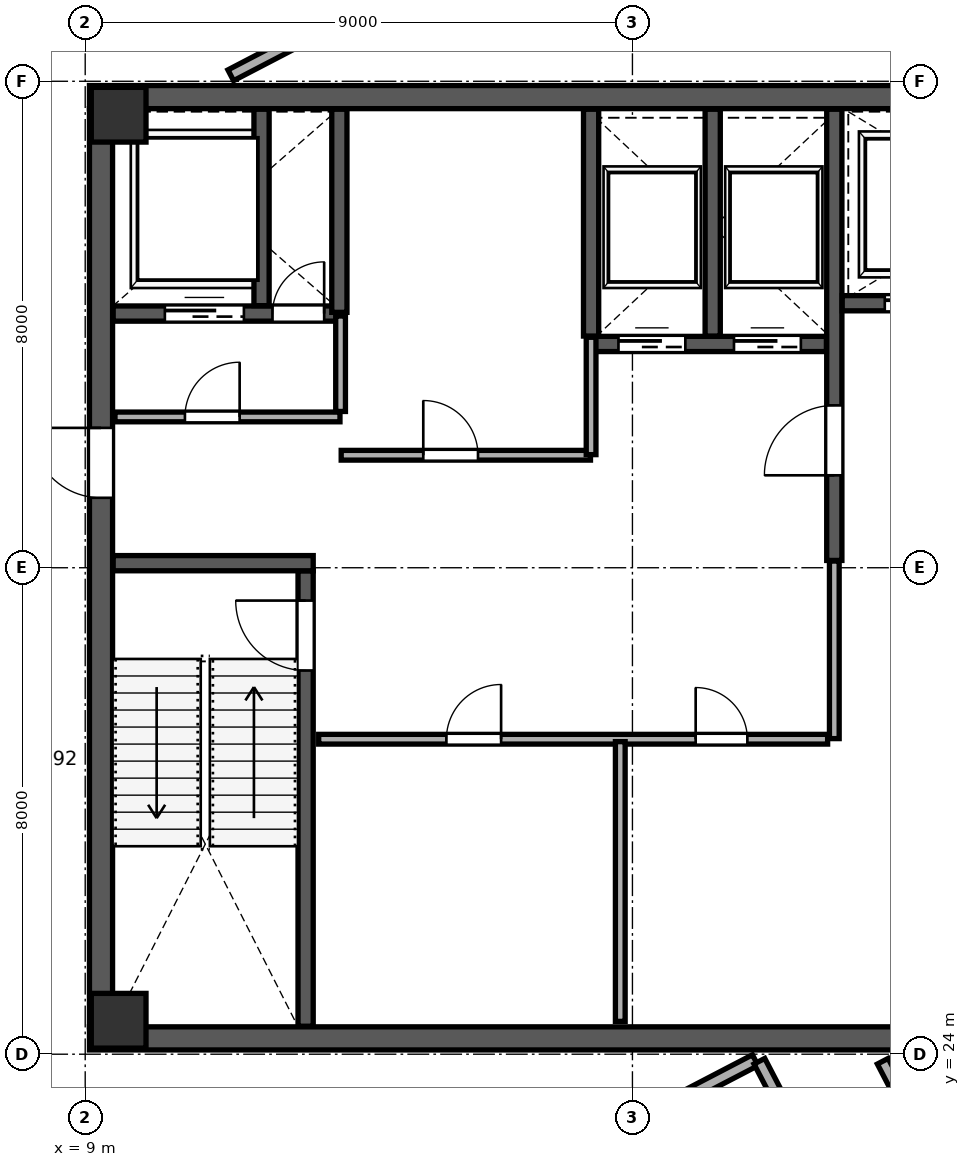
"""IFC4 building model, lengths in metres.
Left out: names, types, materials, properties, quantities, classifications, styles, units other than length and angle.
Written with IfcOpenShell. Run it as: python <this file> out.ifc"""

import sys

from ifc_helpers import new_model, si_unit, direction, frame, frame_2d, origin, origin_2d, place, context, subcontext, project, spatial, rectangle, extrude, source, transform, mapped, element, fill, save


model = new_model("IFC4")
c1 = context("Model", 3, precision=1e-05, world=origin(), true_north=direction((0.0, 1.0)))
c2 = subcontext(c1, "Body", "Model", "MODEL_VIEW")
j1 = project(units=[si_unit("LENGTHUNIT", "METRE"), si_unit("PLANEANGLEUNIT", "RADIAN")], contexts=[c1])
p1 = place(None, origin())
s1 = spatial("IfcSite", under=j1, at=p1, CompositionType="ELEMENT")
p2 = place(p1, origin())
s2 = spatial("IfcBuilding", under=s1, at=p2, CompositionType="ELEMENT")
p3 = place(p2, frame((0.0, 0.0, 336.6)))
s3 = spatial("IfcBuildingStorey", under=s2, at=p3, CompositionType="ELEMENT", Elevation=336.6)
m1 = source(origin(), c2, "Body", "SweptSolid", [
    extrude(rectangle(XDim=0.9, YDim=0.9, at=origin_2d()), origin(), (0.0, 0.0, 1.0), 4.198),
])
for number, where, z_axis, x_axis in (
    (1, (9.55, 24.55, 0.001), (0.0, 0.0, 1.0), (1.0, 0.0, 0.0)),
    (2, (9.55, 39.45, 0.001), (0.0, 0.0, 1.0), (1.0, 0.0, 0.0)),
):
    element("IfcColumn", number, at=place(p3, frame(where, z_axis=z_axis, x_axis=x_axis)), inside=s3, PredefinedType="COLUMN", context=c2, shape_type="MappedRepresentation", body=[
        mapped(m1, transform((0.0, 0.0, 0.0), scale=1.0)),
    ])
p4 = place(p3, frame((9.26, 24.45, 0.0), z_axis=(0.0, 0.0, 1.0), x_axis=(0.0, 1.0, 0.0)))
e3 = element("IfcWall", 3, at=p4, inside=s3, PredefinedType="SHEAR", context=c2, shape_type="SweptSolid", body=[
    extrude(rectangle(XDim=15.1, YDim=0.38, at=frame_2d((7.55, 0.0))), origin(), (0.0, 0.0, 1.0), 3.96),
])
p5 = place(p4, frame((8.7, 0.0, 0.0)))
e4 = element("IfcOpeningElement", 4, at=p5, cuts=e3, PredefinedType="OPENING", context=c2, shape_type="SweptSolid", body=[
    extrude(rectangle(XDim=1.15, YDim=2.2, at=frame_2d((0.575, 1.1))), frame((0.0, 0.2, 0.0), z_axis=(0.0, -1.0, 0.0), x_axis=(1.0, 0.0, 0.0)), (0.0, 0.0, 1.0), 0.4),
])
for number, where, z_axis, x_axis in (
    (5, (9.07, 24.26, 0.0), (0.0, 0.0, 1.0), (1.0, 0.0, 0.0)),
    (6, (9.07, 39.74, 0.0), (0.0, 0.0, 1.0), (1.0, 0.0, 0.0)),
):
    element("IfcWall", number, at=place(p3, frame(where, z_axis=z_axis, x_axis=x_axis)), inside=s3, PredefinedType="SHEAR", context=c2, shape_type="SweptSolid", body=[
        extrude(rectangle(XDim=17.86, YDim=0.38, at=frame_2d((8.93, 0.0))), origin(), (0.0, 0.0, 1.0), 3.96),
    ])
p6 = place(p3, frame((12.625, 24.46, 0.0), z_axis=(0.0, 0.0, 1.0), x_axis=(0.0, 1.0, 0.0)))
e7 = element("IfcWall", 7, at=p6, inside=s3, PredefinedType="SHEAR", context=c2, shape_type="SweptSolid", body=[
    extrude(rectangle(XDim=7.49, YDim=0.25, at=frame_2d((3.745, 0.0))), origin(), (0.0, 0.0, 1.0), 3.96),
])
p7 = place(p6, frame((5.85, 0.0, 0.0)))
e8 = element("IfcOpeningElement", 8, at=p7, cuts=e7, PredefinedType="OPENING", context=c2, shape_type="SweptSolid", body=[
    extrude(rectangle(XDim=1.15, YDim=2.2, at=frame_2d((0.575, 1.1))), frame((0.0, 0.135, 0.0), z_axis=(0.0, -1.0, 0.0), x_axis=(1.0, 0.0, 0.0)), (0.0, 0.0, 1.0), 0.27),
])
p8 = place(p3, frame((9.46, 32.075, 0.0), z_axis=(0.0, 0.0, 1.0), x_axis=(1.0, 0.0, 0.0)))
e9 = element("IfcWall", 9, at=p8, inside=s3, PredefinedType="SHEAR", context=c2, shape_type="SweptSolid", body=[
    extrude(rectangle(XDim=3.29, YDim=0.25, at=frame_2d((1.645, 0.0))), origin(), (0.0, 0.0, 1.0), 3.96),
])
p9 = place(p3, frame((21.32, 32.12, 0.0), z_axis=(0.0, 0.0, 1.0), x_axis=(0.0, 1.0, 0.0)))
e10 = element("IfcWall", 10, at=p9, inside=s3, PredefinedType="SHEAR", context=c2, shape_type="SweptSolid", body=[
    extrude(rectangle(XDim=7.42, YDim=0.25, at=frame_2d((3.71, 0.0))), origin(), (0.0, 0.0, 1.0), 3.96),
])
p10 = place(p9, frame((1.4, 0.0, 0.0)))
e11 = element("IfcOpeningElement", 11, at=p10, cuts=e10, PredefinedType="OPENING", context=c2, shape_type="SweptSolid", body=[
    extrude(rectangle(XDim=1.15, YDim=2.2, at=frame_2d((0.575, 1.1))), frame((0.0, 0.135, 0.0), z_axis=(0.0, -1.0, 0.0), x_axis=(1.0, 0.0, 0.0)), (0.0, 0.0, 1.0), 0.27),
])
p11 = place(p3, frame((9.46, 36.18, 0.0), z_axis=(0.0, 0.0, 1.0), x_axis=(1.0, 0.0, 0.0)))
e12 = element("IfcWall", 12, at=p11, inside=s3, PredefinedType="SHEAR", context=c2, shape_type="SweptSolid", body=[
    extrude(rectangle(XDim=3.79, YDim=0.25, at=frame_2d((1.895, 0.0))), origin(), (0.0, 0.0, 1.0), 3.96),
])
p12 = place(p11, frame((2.62, 0.0, 0.0)))
e13 = element("IfcOpeningElement", 13, at=p12, cuts=e12, PredefinedType="OPENING", context=c2, shape_type="SweptSolid", body=[
    extrude(rectangle(XDim=0.85, YDim=2.1, at=frame_2d((0.425, 1.05))), frame((0.0, 0.135, 0.0), z_axis=(0.0, -1.0, 0.0), x_axis=(1.0, 0.0, 0.0)), (0.0, 0.0, 1.0), 0.27),
])
p13 = place(p11, frame((0.85, 0.0, 0.0)))
e14 = element("IfcOpeningElement", 14, at=p13, cuts=e12, PredefinedType="OPENING", context=c2, shape_type="SweptSolid", body=[
    extrude(rectangle(XDim=1.3, YDim=2.25, at=frame_2d((0.65, 1.125))), frame((0.0, 0.135, 0.0), z_axis=(0.0, -1.0, 0.0), x_axis=(1.0, 0.0, 0.0)), (0.0, 0.0, 1.0), 0.27),
])
p14 = place(p3, frame((11.9, 36.31, 0.0), z_axis=(0.0, 0.0, 1.0), x_axis=(0.0, 1.0, 0.0)))
e15 = element("IfcWall", 15, at=p14, inside=s3, PredefinedType="SHEAR", context=c2, shape_type="SweptSolid", body=[
    extrude(rectangle(XDim=3.23, YDim=0.25, at=frame_2d((1.615, 0.0))), origin(), (0.0, 0.0, 1.0), 3.96),
])
p15 = place(p3, frame((21.45, 36.35, 0.0), z_axis=(0.0, 0.0, 1.0), x_axis=(1.0, 0.0, 0.0)))
e16 = element("IfcWall", 16, at=p15, inside=s3, PredefinedType="SHEAR", context=c2, shape_type="SweptSolid", body=[
    extrude(rectangle(XDim=5.09, YDim=0.25, at=frame_2d((2.545, 0.0))), origin(), (0.0, 0.0, 1.0), 3.96),
])
p16 = place(p15, frame((0.7, 0.0, 0.0)))
e17 = element("IfcOpeningElement", 17, at=p16, cuts=e16, PredefinedType="OPENING", context=c2, shape_type="SweptSolid", body=[
    extrude(rectangle(XDim=1.2, YDim=2.2, at=frame_2d((0.6, 1.1))), frame((0.0, 0.135, 0.0), z_axis=(0.0, -1.0, 0.0), x_axis=(1.0, 0.0, 0.0)), (0.0, 0.0, 1.0), 0.27),
])
p17 = place(p15, frame((3.25, 0.0, 0.0)))
e18 = element("IfcOpeningElement", 18, at=p17, cuts=e16, PredefinedType="OPENING", context=c2, shape_type="SweptSolid", body=[
    extrude(rectangle(XDim=1.2, YDim=2.2, at=frame_2d((0.6, 1.1))), frame((0.0, 0.135, 0.0), z_axis=(0.0, -1.0, 0.0), x_axis=(1.0, 0.0, 0.0)), (0.0, 0.0, 1.0), 0.27),
])
p18 = place(p3, frame((13.18, 36.2, 0.0), z_axis=(0.0, 0.0, 1.0), x_axis=(0.0, 1.0, 0.0)))
e19 = element("IfcWall", 19, at=p18, inside=s3, PredefinedType="SHEAR", context=c2, shape_type="SweptSolid", body=[
    extrude(rectangle(XDim=3.34, YDim=0.25, at=frame_2d((1.67, 0.0))), origin(), (0.0, 0.0, 1.0), 3.96),
])
p19 = place(p3, frame((17.32, 35.68, 0.0), z_axis=(0.0, 0.0, 1.0), x_axis=(1.0, 0.0, 0.0)))
e20 = element("IfcWall", 20, at=p19, inside=s3, PredefinedType="SHEAR", context=c2, shape_type="SweptSolid", body=[
    extrude(rectangle(XDim=3.87, YDim=0.25, at=frame_2d((1.935, 0.0))), origin(), (0.0, 0.0, 1.0), 3.96),
])
p20 = place(p19, frame((0.45, 0.0, 0.0)))
e21 = element("IfcOpeningElement", 21, at=p20, cuts=e20, PredefinedType="OPENING", context=c2, shape_type="SweptSolid", body=[
    extrude(rectangle(XDim=1.1, YDim=2.2, at=frame_2d((0.55, 1.1))), frame((0.0, 0.135, 0.0), z_axis=(0.0, -1.0, 0.0), x_axis=(1.0, 0.0, 0.0)), (0.0, 0.0, 1.0), 0.27),
])
p21 = place(p19, frame((2.35, 0.0, 0.0)))
e22 = element("IfcOpeningElement", 22, at=p21, cuts=e20, PredefinedType="OPENING", context=c2, shape_type="SweptSolid", body=[
    extrude(rectangle(XDim=1.1, YDim=2.2, at=frame_2d((0.55, 1.1))), frame((0.0, 0.135, 0.0), z_axis=(0.0, -1.0, 0.0), x_axis=(1.0, 0.0, 0.0)), (0.0, 0.0, 1.0), 0.27),
])
for number, where, z_axis, x_axis in (
    (23, (17.32, 35.81, 0.0), (0.0, 0.0, 1.0), (0.0, 1.0, 0.0)),
    (24, (19.32, 35.81, 0.0), (0.0, 0.0, 1.0), (0.0, 1.0, 0.0)),
):
    element("IfcWall", number, at=place(p3, frame(where, z_axis=z_axis, x_axis=x_axis)), inside=s3, PredefinedType="SHEAR", context=c2, shape_type="SweptSolid", body=[
        extrude(rectangle(XDim=3.73, YDim=0.25, at=frame_2d((1.865, 0.0))), origin(), (0.0, 0.0, 1.0), 3.96),
    ])
p22 = place(p3, frame((9.49, 34.48, 0.0), z_axis=(0.0, 0.0, 1.0), x_axis=(1.0, 0.0, 0.0)))
e25 = element("IfcWall", 25, at=p22, inside=s3, PredefinedType="PARTITIONING", context=c2, shape_type="SweptSolid", body=[
    extrude(rectangle(XDim=3.7, YDim=0.16, at=frame_2d((1.85, 0.0))), origin(), (0.0, 0.0, 1.0), 3.96),
])
p23 = place(p22, frame((1.15, 0.0, 0.0)))
e26 = element("IfcOpeningElement", 26, at=p23, cuts=e25, PredefinedType="OPENING", context=c2, shape_type="SweptSolid", body=[
    extrude(rectangle(XDim=0.9, YDim=2.15, at=frame_2d((0.45, 1.075))), frame((0.0, 0.09, 0.0), z_axis=(0.0, -1.0, 0.0), x_axis=(1.0, 0.0, 0.0)), (0.0, 0.0, 1.0), 0.18),
])
p24 = place(p3, frame((13.2, 34.57, 0.0), z_axis=(0.0, 0.0, 1.0), x_axis=(0.0, 1.0, 0.0)))
e27 = element("IfcWall", 27, at=p24, inside=s3, PredefinedType="PARTITIONING", context=c2, shape_type="SweptSolid", body=[
    extrude(rectangle(XDim=1.57, YDim=0.16, at=frame_2d((0.785, 0.0))), origin(), (0.0, 0.0, 1.0), 3.96),
])
p25 = place(p3, frame((13.21, 33.85, 0.0), z_axis=(0.0, 0.0, 1.0), x_axis=(1.0, 0.0, 0.0)))
e28 = element("IfcWall", 28, at=p25, inside=s3, PredefinedType="PARTITIONING", context=c2, shape_type="SweptSolid", body=[
    extrude(rectangle(XDim=4.1, YDim=0.16, at=frame_2d((2.05, 0.0))), origin(), (0.0, 0.0, 1.0), 3.96),
])
p26 = place(p25, frame((1.35, 0.0, 0.0)))
e29 = element("IfcOpeningElement", 29, at=p26, cuts=e28, PredefinedType="OPENING", context=c2, shape_type="SweptSolid", body=[
    extrude(rectangle(XDim=0.9, YDim=2.15, at=frame_2d((0.45, 1.075))), frame((0.0, 0.09, 0.0), z_axis=(0.0, -1.0, 0.0), x_axis=(1.0, 0.0, 0.0)), (0.0, 0.0, 1.0), 0.18),
])
p27 = place(p3, frame((17.32, 33.86, 0.0), z_axis=(0.0, 0.0, 1.0), x_axis=(0.0, 1.0, 0.0)))
e30 = element("IfcWall", 30, at=p27, inside=s3, PredefinedType="PARTITIONING", context=c2, shape_type="SweptSolid", body=[
    extrude(rectangle(XDim=1.93, YDim=0.16, at=frame_2d((0.965, 0.0))), origin(), (0.0, 0.0, 1.0), 3.96),
])
p28 = place(p3, frame((12.84, 29.18, 0.0), z_axis=(0.0, 0.0, 1.0), x_axis=(1.0, 0.0, 0.0)))
e31 = element("IfcWall", 31, at=p28, inside=s3, PredefinedType="PARTITIONING", context=c2, shape_type="SweptSolid", body=[
    extrude(rectangle(XDim=8.37, YDim=0.16, at=frame_2d((4.185, 0.0))), origin(), (0.0, 0.0, 1.0), 3.96),
])
p29 = place(p28, frame((2.1, 0.0, 0.0)))
e32 = element("IfcOpeningElement", 32, at=p29, cuts=e31, PredefinedType="OPENING", context=c2, shape_type="SweptSolid", body=[
    extrude(rectangle(XDim=0.9, YDim=2.15, at=frame_2d((0.45, 1.075))), frame((0.0, 0.09, 0.0), z_axis=(0.0, -1.0, 0.0), x_axis=(1.0, 0.0, 0.0)), (0.0, 0.0, 1.0), 0.18),
])
p30 = place(p28, frame((6.2, 0.0, 0.0)))
e33 = element("IfcOpeningElement", 33, at=p30, cuts=e31, PredefinedType="OPENING", context=c2, shape_type="SweptSolid", body=[
    extrude(rectangle(XDim=0.85, YDim=2.1, at=frame_2d((0.425, 1.05))), frame((0.0, 0.09, 0.0), z_axis=(0.0, -1.0, 0.0), x_axis=(1.0, 0.0, 0.0)), (0.0, 0.0, 1.0), 0.18),
])
p31 = place(p3, frame((17.8, 24.54, 0.0), z_axis=(0.0, 0.0, 1.0), x_axis=(0.0, 1.0, 0.0)))
e34 = element("IfcWall", 34, at=p31, inside=s3, PredefinedType="PARTITIONING", context=c2, shape_type="SweptSolid", body=[
    extrude(rectangle(XDim=4.6, YDim=0.16, at=frame_2d((2.3, 0.0))), origin(), (0.0, 0.0, 1.0), 3.96),
])
p32 = place(p3, frame((21.32, 29.19, 0.0), z_axis=(0.0, 0.0, 1.0), x_axis=(0.0, 1.0, 0.0)))
e35 = element("IfcWall", 35, at=p32, inside=s3, PredefinedType="PARTITIONING", context=c2, shape_type="SweptSolid", body=[
    extrude(rectangle(XDim=2.92, YDim=0.16, at=frame_2d((1.46, 0.0))), origin(), (0.0, 0.0, 1.0), 3.96),
])
p33 = place(p3, frame((0.013, 38.776, 0.0), z_axis=(0.0, 0.0, 1.0), x_axis=(0.461746796058, -0.887011779138, 0.0)))
e36 = element("IfcWall", 36, at=p33, inside=s3, PredefinedType="SOLIDWALL", context=c2, shape_type="SweptSolid", body=[
    extrude(rectangle(XDim=22.392, YDim=0.2, at=frame_2d((11.196, 0.0))), origin(), (0.0, 0.0, 1.0), 3.96),
])
p34 = place(p33, frame((14.97, 0.0, 0.0)))
e37 = element("IfcOpeningElement", 37, at=p34, cuts=e36, PredefinedType="OPENING", context=c2, shape_type="SweptSolid", body=[
    extrude(rectangle(XDim=1.1, YDim=2.2, at=frame_2d((0.55, 1.1))), frame((0.0, 0.11, 0.0), z_axis=(0.0, -1.0, 0.0), x_axis=(1.0, 0.0, 0.0)), (0.0, 0.0, 1.0), 0.22),
])
p35 = place(p3, frame((8.569, 17.94, 0.0), z_axis=(0.0, 0.0, 1.0), x_axis=(0.88700833088, 0.461753420073, 0.0)))
e38 = element("IfcWall", 38, at=p35, inside=s3, PredefinedType="SOLIDWALL", context=c2, shape_type="SweptSolid", body=[
    extrude(rectangle(XDim=12.91, YDim=0.2, at=frame_2d((6.455, 0.0))), origin(), (0.0, 0.0, 1.0), 3.96),
])
p36 = place(p3, frame((20.088, 23.885, 0.0), z_axis=(0.0, 0.0, 1.0), x_axis=(0.461735279655, -0.887017774073, 0.0)))
e39 = element("IfcWall", 39, at=p36, inside=s3, PredefinedType="SOLIDWALL", context=c2, shape_type="SweptSolid", body=[
    extrude(rectangle(XDim=11.674, YDim=0.2, at=frame_2d((5.837, 0.0))), origin(), (0.0, 0.0, 1.0), 3.96),
])
p37 = place(p36, frame((1.4, 0.0, 0.0)))
e40 = element("IfcOpeningElement", 40, at=p37, cuts=e39, PredefinedType="OPENING", context=c2, shape_type="SweptSolid", body=[
    extrude(rectangle(XDim=1.2, YDim=2.2, at=frame_2d((0.6, 1.1))), frame((0.0, 0.11, 0.0), z_axis=(0.0, -1.0, 0.0), x_axis=(1.0, 0.0, 0.0)), (0.0, 0.0, 1.0), 0.22),
])
p38 = place(p3, frame((22.117, 23.885, 0.0), z_axis=(0.0, 0.0, 1.0), x_axis=(0.461743612554, -0.88701343635, 0.0)))
e41 = element("IfcWall", 41, at=p38, inside=s3, PredefinedType="SOLIDWALL", context=c2, shape_type="SweptSolid", body=[
    extrude(rectangle(XDim=10.737, YDim=0.2, at=frame_2d((5.368, 0.0))), origin(), (0.0, 0.0, 1.0), 3.96),
])
p39 = place(p38, frame((1.2, 0.0, 0.0)))
e42 = element("IfcOpeningElement", 42, at=p39, cuts=e41, PredefinedType="OPENING", context=c2, shape_type="SweptSolid", body=[
    extrude(rectangle(XDim=1.2, YDim=2.2, at=frame_2d((0.6, 1.1))), frame((0.0, 0.11, 0.0), z_axis=(0.0, -1.0, 0.0), x_axis=(1.0, 0.0, 0.0)), (0.0, 0.0, 1.0), 0.22),
])
p40 = place(p38, frame((7.35, 0.0, 0.0)))
e43 = element("IfcOpeningElement", 43, at=p40, cuts=e41, PredefinedType="OPENING", context=c2, shape_type="SweptSolid", body=[
    extrude(rectangle(XDim=1.2, YDim=2.2, at=frame_2d((0.6, 1.1))), frame((0.0, 0.11, 0.0), z_axis=(0.0, -1.0, 0.0), x_axis=(1.0, 0.0, 0.0)), (0.0, 0.0, 1.0), 0.22),
])
p41 = place(p3, frame((11.394, 40.098, 0.0), z_axis=(0.0, 0.0, 1.0), x_axis=(0.887004496891, 0.461760784925, 0.0)))
e44 = element("IfcWall", 44, at=p41, inside=s3, PredefinedType="SOLIDWALL", context=c2, shape_type="SweptSolid", body=[
    extrude(rectangle(XDim=15.785, YDim=0.2, at=frame_2d((7.893, 0.0))), origin(), (0.0, 0.0, 1.0), 3.96),
])
p42 = place(p41, frame((13.56, 0.0, 0.0)))
e45 = element("IfcOpeningElement", 45, at=p42, cuts=e44, PredefinedType="OPENING", context=c2, shape_type="SweptSolid", body=[
    extrude(rectangle(XDim=1.2, YDim=2.2, at=frame_2d((0.6, 1.1))), frame((0.0, 0.11, 0.0), z_axis=(0.0, -1.0, 0.0), x_axis=(1.0, 0.0, 0.0)), (0.0, 0.0, 1.0), 0.22),
])
m2 = source(origin(), c2, "Body", "SweptSolid", [
    extrude(rectangle(XDim=1.15, YDim=2.2, at=frame_2d((0.575, 1.1))), frame((0.0, 0.025, 0.0), z_axis=(0.0, -1.0, 0.0), x_axis=(1.0, 0.0, 0.0)), (0.0, 0.0, 1.0), 0.05),
])
p43 = place(p7, origin())
e46 = element("IfcDoor", 46, at=p43, inside=s3, OperationType="SINGLE_SWING_RIGHT", PredefinedType="DOOR", context=c2, shape_type="MappedRepresentation", body=[
    mapped(m2, transform((0.0, 0.0, 0.0), scale=1.0)),
])
fill(e8, e46)
m3 = source(origin(), c2, "Body", "SweptSolid", [
    extrude(rectangle(XDim=1.15, YDim=2.2, at=frame_2d((0.575, 1.1))), frame((0.0, 0.025, 0.0), z_axis=(0.0, -1.0, 0.0), x_axis=(1.0, 0.0, 0.0)), (0.0, 0.0, 1.0), 0.05),
])
p44 = place(p10, origin())
e47 = element("IfcDoor", 47, at=p44, inside=s3, OperationType="SINGLE_SWING_LEFT", PredefinedType="DOOR", context=c2, shape_type="MappedRepresentation", body=[
    mapped(m3, transform((0.0, 0.0, 0.0), scale=1.0)),
])
fill(e11, e47)
p45 = place(p5, origin())
e48 = element("IfcDoor", 48, at=p45, inside=s3, OperationType="SINGLE_SWING_RIGHT", PredefinedType="DOOR", context=c2, shape_type="MappedRepresentation", body=[
    mapped(m3, transform((0.0, 0.0, 0.0), scale=1.0)),
])
fill(e4, e48)
m4 = source(origin(), c2, "Body", "SweptSolid", [
    extrude(rectangle(XDim=0.85, YDim=2.1, at=frame_2d((0.425, 1.05))), frame((0.0, 0.025, 0.0), z_axis=(0.0, -1.0, 0.0), x_axis=(1.0, 0.0, 0.0)), (0.0, 0.0, 1.0), 0.05),
])
p46 = place(p12, origin())
e49 = element("IfcDoor", 49, at=p46, inside=s3, OperationType="SINGLE_SWING_RIGHT", PredefinedType="DOOR", context=c2, shape_type="MappedRepresentation", body=[
    mapped(m4, transform((0.0, 0.0, 0.0), scale=1.0)),
])
fill(e13, e49)
m5 = source(origin(), c2, "Body", "SweptSolid", [
    extrude(rectangle(XDim=1.1, YDim=2.2, at=frame_2d((0.55, 1.1))), frame((0.0, 0.025, 0.0), z_axis=(0.0, -1.0, 0.0), x_axis=(1.0, 0.0, 0.0)), (0.0, 0.0, 1.0), 0.05),
])
p47 = place(p20, origin())
e50 = element("IfcDoor", 50, at=p47, inside=s3, OperationType="SLIDING_TO_LEFT", PredefinedType="DOOR", context=c2, shape_type="MappedRepresentation", body=[
    mapped(m5, transform((0.0, 0.0, 0.0), scale=1.0)),
])
fill(e21, e50)
p48 = place(p21, origin())
e51 = element("IfcDoor", 51, at=p48, inside=s3, OperationType="SLIDING_TO_RIGHT", PredefinedType="DOOR", context=c2, shape_type="MappedRepresentation", body=[
    mapped(m5, transform((0.0, 0.0, 0.0), scale=1.0)),
])
fill(e22, e51)
m6 = source(origin(), c2, "Body", "SweptSolid", [
    extrude(rectangle(XDim=1.2, YDim=2.2, at=frame_2d((0.6, 1.1))), frame((0.0, 0.025, 0.0), z_axis=(0.0, -1.0, 0.0), x_axis=(1.0, 0.0, 0.0)), (0.0, 0.0, 1.0), 0.05),
])
p49 = place(p16, origin())
e52 = element("IfcDoor", 52, at=p49, inside=s3, OperationType="SLIDING_TO_LEFT", PredefinedType="DOOR", context=c2, shape_type="MappedRepresentation", body=[
    mapped(m6, transform((0.0, 0.0, 0.0), scale=1.0)),
])
fill(e17, e52)
m7 = source(origin(), c2, "Body", "SweptSolid", [
    extrude(rectangle(XDim=1.3, YDim=2.25, at=frame_2d((0.65, 1.125))), frame((0.0, 0.025, 0.0), z_axis=(0.0, -1.0, 0.0), x_axis=(1.0, 0.0, 0.0)), (0.0, 0.0, 1.0), 0.05),
])
p50 = place(p13, origin())
e53 = element("IfcDoor", 53, at=p50, inside=s3, OperationType="SLIDING_TO_LEFT", PredefinedType="DOOR", context=c2, shape_type="MappedRepresentation", body=[
    mapped(m7, transform((0.0, 0.0, 0.0), scale=1.0)),
])
fill(e14, e53)
m8 = source(origin(), c2, "Body", "SweptSolid", [
    extrude(rectangle(XDim=0.9, YDim=2.15, at=frame_2d((0.45, 1.075))), frame((0.0, 0.025, 0.0), z_axis=(0.0, -1.0, 0.0), x_axis=(1.0, 0.0, 0.0)), (0.0, 0.0, 1.0), 0.05),
])
p51 = place(p23, origin())
e54 = element("IfcDoor", 54, at=p51, inside=s3, OperationType="SINGLE_SWING_RIGHT", PredefinedType="DOOR", context=c2, shape_type="MappedRepresentation", body=[
    mapped(m8, transform((0.0, 0.0, 0.0), scale=1.0)),
])
fill(e26, e54)
p52 = place(p26, origin())
e55 = element("IfcDoor", 55, at=p52, inside=s3, OperationType="SINGLE_SWING_LEFT", PredefinedType="DOOR", context=c2, shape_type="MappedRepresentation", body=[
    mapped(m8, transform((0.0, 0.0, 0.0), scale=1.0)),
])
fill(e29, e55)
p53 = place(p29, origin())
e56 = element("IfcDoor", 56, at=p53, inside=s3, OperationType="SINGLE_SWING_RIGHT", PredefinedType="DOOR", context=c2, shape_type="MappedRepresentation", body=[
    mapped(m8, transform((0.0, 0.0, 0.0), scale=1.0)),
])
fill(e32, e56)
p54 = place(p30, origin())
e57 = element("IfcDoor", 57, at=p54, inside=s3, OperationType="SINGLE_SWING_LEFT", PredefinedType="DOOR", context=c2, shape_type="MappedRepresentation", body=[
    mapped(m4, transform((0.0, 0.0, 0.0), scale=1.0)),
])
fill(e33, e57)
save(model, sys.argv[1])
